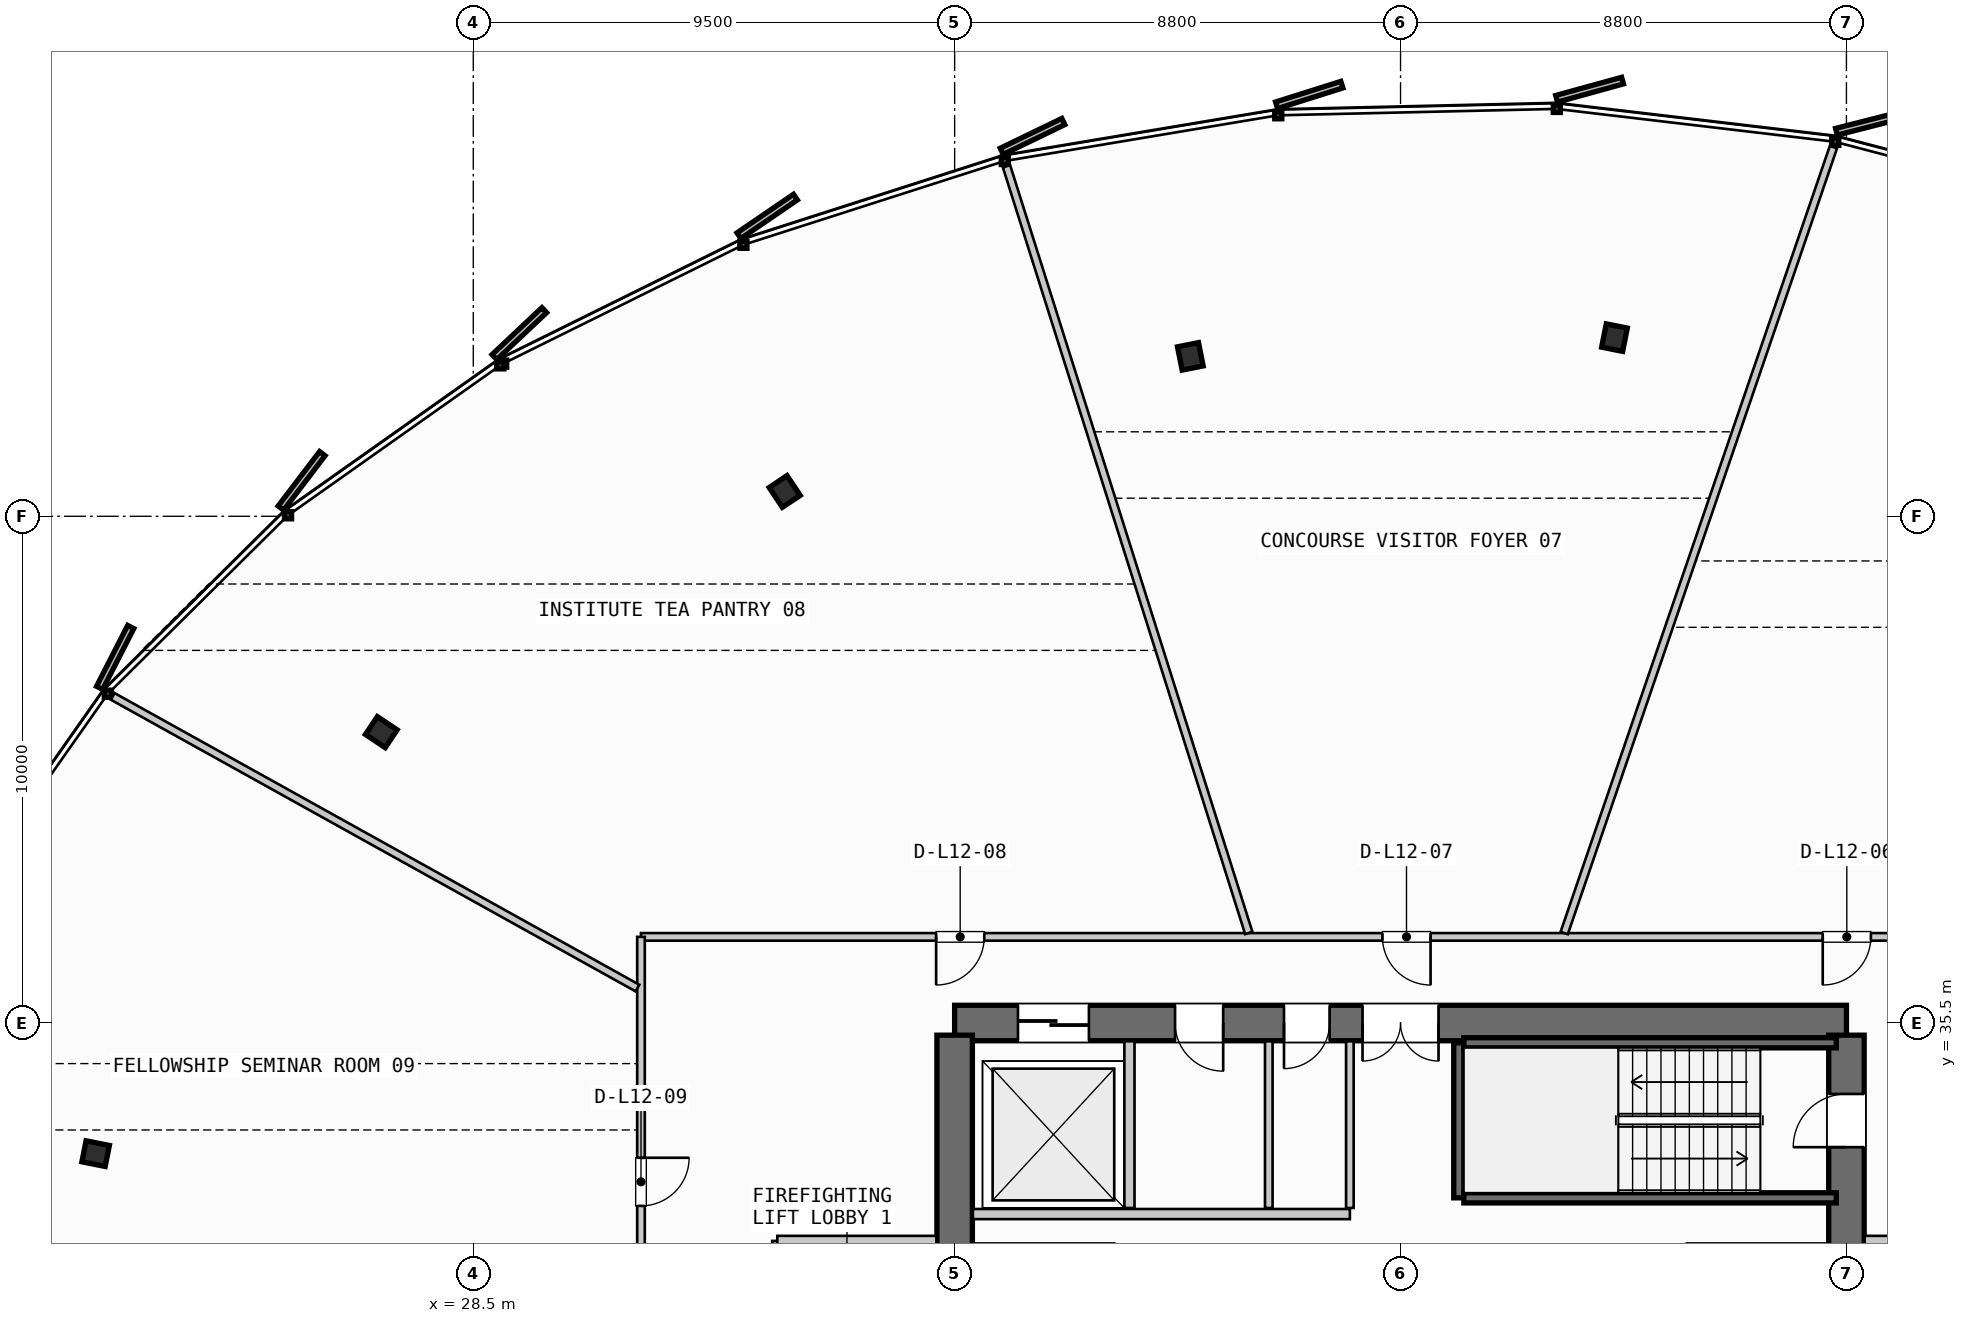
"""IFC4 building model, lengths in metres.
Left out: names, types, materials, properties, quantities, classifications, styles, units other than length and angle.
Written with IfcOpenShell. Run it as: python <this file> out.ifc"""

import sys

from ifc_helpers import new_model, si_unit, direction, frame, frame_2d, origin, origin_2d, place, context, subcontext, project, spatial, rectangle, i_section, extrude, source, transform, mapped, element, fill, save


model = new_model("IFC4")
c1 = context("Model", 3, precision=1e-05, world=origin(), true_north=direction((0.0, 1.0)))
c2 = subcontext(c1, "Body", "Model", "MODEL_VIEW")
j1 = project(units=[si_unit("LENGTHUNIT", "METRE"), si_unit("PLANEANGLEUNIT", "RADIAN")], contexts=[c1])
p1 = place(None, origin())
s1 = spatial("IfcSite", under=j1, at=p1, CompositionType="ELEMENT")
p2 = place(p1, origin())
s2 = spatial("IfcBuilding", under=s1, at=p2, CompositionType="ELEMENT")
p3 = place(p2, frame((0.0, 0.0, 52.4)))
s3 = spatial("IfcBuildingStorey", under=s2, at=p3, CompositionType="ELEMENT", Elevation=52.4)
p4 = place(p3, frame((55.6, 35.5, 0.0), z_axis=(0.0, 0.0, 1.0), x_axis=(-1.0, 0.0, 0.0)))
e1 = element("IfcWall", 1, at=p4, inside=s3, PredefinedType="SHEAR", context=c2, shape_type="SweptSolid", body=[
    extrude(rectangle(XDim=17.6, YDim=0.7, at=frame_2d((8.8, 0.0))), origin(), (0.0, 0.0, 1.0), 3.55),
])
p5 = place(p4, frame((8.05, 0.0, 0.0)))
e2 = element("IfcOpeningElement", 2, at=p5, cuts=e1, PredefinedType="OPENING", context=c2, shape_type="SweptSolid", body=[
    extrude(rectangle(XDim=1.5, YDim=2.2, at=frame_2d((0.75, 1.1))), frame((0.0, 0.36, 0.0), z_axis=(0.0, -1.0, 0.0), x_axis=(1.0, 0.0, 0.0)), (0.0, 0.0, 1.0), 0.72),
])
p6 = place(p4, frame((14.95, 0.0, 0.0)))
e3 = element("IfcOpeningElement", 3, at=p6, cuts=e1, PredefinedType="OPENING", context=c2, shape_type="SweptSolid", body=[
    extrude(rectangle(XDim=1.4, YDim=2.3, at=frame_2d((0.7, 1.15))), frame((0.0, 0.36, 0.0), z_axis=(0.0, -1.0, 0.0), x_axis=(1.0, 0.0, 0.0)), (0.0, 0.0, 1.0), 0.72),
])
p7 = place(p4, frame((12.3, 0.0, 0.0)))
e4 = element("IfcOpeningElement", 4, at=p7, cuts=e1, PredefinedType="OPENING", context=c2, shape_type="SweptSolid", body=[
    extrude(rectangle(XDim=0.95, YDim=2.15, at=frame_2d((0.475, 1.075))), frame((0.0, 0.36, 0.0), z_axis=(0.0, -1.0, 0.0), x_axis=(1.0, 0.0, 0.0)), (0.0, 0.0, 1.0), 0.72),
])
p8 = place(p4, frame((10.2, 0.0, 0.0)))
e5 = element("IfcOpeningElement", 5, at=p8, cuts=e1, PredefinedType="OPENING", context=c2, shape_type="SweptSolid", body=[
    extrude(rectangle(XDim=0.9, YDim=2.15, at=frame_2d((0.45, 1.075))), frame((0.0, 0.36, 0.0), z_axis=(0.0, -1.0, 0.0), x_axis=(1.0, 0.0, 0.0)), (0.0, 0.0, 1.0), 0.72),
])
p9 = place(p3, frame((38.0, 35.26, 0.0), z_axis=(0.0, 0.0, 1.0), x_axis=(0.0, -1.0, 0.0)))
e6 = element("IfcWall", 6, at=p9, inside=s3, PredefinedType="SHEAR", context=c2, shape_type="SweptSolid", body=[
    extrude(rectangle(XDim=14.92, YDim=0.7, at=frame_2d((7.46, 0.0))), origin(), (0.0, 0.0, 1.0), 3.55),
])
p10 = place(p9, frame((5.21, 0.0, 0.0)))
e7 = element("IfcOpeningElement", 7, at=p10, cuts=e6, PredefinedType="OPENING", context=c2, shape_type="SweptSolid", body=[
    extrude(rectangle(XDim=1.1, YDim=2.2, at=frame_2d((0.55, 1.1))), frame((0.0, 0.36, 0.0), z_axis=(0.0, -1.0, 0.0), x_axis=(1.0, 0.0, 0.0)), (0.0, 0.0, 1.0), 0.72),
])
p11 = place(p3, frame((55.6, 20.34, 0.0), z_axis=(0.0, 0.0, 1.0), x_axis=(0.0, 1.0, 0.0)))
e8 = element("IfcWall", 8, at=p11, inside=s3, PredefinedType="SHEAR", context=c2, shape_type="SweptSolid", body=[
    extrude(rectangle(XDim=14.92, YDim=0.7, at=frame_2d((7.46, 0.0))), origin(), (0.0, 0.0, 1.0), 3.55),
])
p12 = place(p11, frame((12.71, 0.0, 0.0)))
e9 = element("IfcOpeningElement", 9, at=p12, cuts=e8, PredefinedType="OPENING", context=c2, shape_type="SweptSolid", body=[
    extrude(rectangle(XDim=1.05, YDim=2.15, at=frame_2d((0.525, 1.075))), frame((0.0, 0.36, 0.0), z_axis=(0.0, -1.0, 0.0), x_axis=(1.0, 0.0, 0.0)), (0.0, 0.0, 1.0), 0.72),
])
p13 = place(p11, frame((8.61, 0.0, 0.0)))
e10 = element("IfcOpeningElement", 10, at=p13, cuts=e8, PredefinedType="OPENING", context=c2, shape_type="SweptSolid", body=[
    extrude(rectangle(XDim=1.1, YDim=2.2, at=frame_2d((0.55, 1.1))), frame((0.0, 0.36, 0.0), z_axis=(0.0, -1.0, 0.0), x_axis=(1.0, 0.0, 0.0)), (0.0, 0.0, 1.0), 0.72),
])
m1 = source(origin(), c2, "Body", "SweptSolid", [
    extrude(i_section(OverallWidth=0.423, OverallDepth=0.469, WebThickness=0.051, FlangeThickness=0.081, FilletRadius=0.015, at=origin_2d()), origin(), (0.0, 0.0, 1.0), 3.55),
])
for number, where, z_axis, x_axis in (
    (11, (51.022, 49.026, 0.0), (0.0, 0.0, 1.0), (0.195, 0.981, 0.0)),
    (12, (42.652, 48.656, 0.0), (0.0, 0.0, 1.0), (-0.195, 0.981, 0.0)),
    (13, (34.646, 45.99, 0.0), (0.0, 0.0, 1.0), (-0.556, 0.831, 0.0)),
    (14, (26.685, 41.241, 0.0), (0.0, 0.0, 1.0), (-0.831, 0.556, 0.0)),
    (15, (21.047, 32.923, 0.0), (0.0, 0.0, 1.0), (-0.981, 0.195, 0.0)),
):
    element("IfcColumn", number, at=place(p3, frame(where, z_axis=z_axis, x_axis=x_axis)), inside=s3, PredefinedType="COLUMN", context=c2, shape_type="MappedRepresentation", body=[
        mapped(m1, transform((0.0, 0.0, 0.0), scale=1.0)),
    ])
p14 = place(p3, frame((47.95, 32.05, 0.0), z_axis=(0.0, 0.0, 1.0), x_axis=(0.0, 1.0, 0.0)))
e16 = element("IfcWall", 16, at=p14, inside=s3, PredefinedType="SHEAR", context=c2, shape_type="SweptSolid", body=[
    extrude(rectangle(XDim=3.06, YDim=0.2, at=frame_2d((1.53, 0.0))), origin(), (0.0, 0.0, 1.0), 3.55),
])
for number, where, z_axis, x_axis in (
    (17, (48.05, 35.11, 0.0), (0.0, 0.0, 1.0), (1.0, 0.0, 0.0)),
    (18, (55.4, 32.05, 0.0), (0.0, 0.0, 1.0), (-1.0, 0.0, 0.0)),
):
    element("IfcWall", number, at=place(p3, frame(where, z_axis=z_axis, x_axis=x_axis)), inside=s3, PredefinedType="SHEAR", context=c2, shape_type="SweptSolid", body=[
        extrude(rectangle(XDim=7.35, YDim=0.2, at=frame_2d((3.675, 0.0))), origin(), (0.0, 0.0, 1.0), 3.55),
    ])
p15 = place(p3, frame((38.36, 31.05, 0.0), z_axis=(0.0, 0.0, 1.0), x_axis=(1.0, 0.0, 0.0)))
e19 = element("IfcWall", 19, at=p15, inside=s3, PredefinedType="PARTITIONING", context=c2, shape_type="SweptSolid", body=[
    extrude(rectangle(XDim=2.79, YDim=0.2, at=frame_2d((1.395, 0.0))), origin(), (0.0, 0.0, 1.0), 2.645),
])
p16 = place(p3, frame((34.5, 31.2, 0.0), z_axis=(0.0, 0.0, 1.0), x_axis=(0.0, -1.0, 0.0)))
e20 = element("IfcWall", 20, at=p16, inside=s3, PredefinedType="PARTITIONING", context=c2, shape_type="SweptSolid", body=[
    extrude(rectangle(XDim=4.4, YDim=0.2, at=frame_2d((2.2, 0.0))), origin(), (0.0, 0.0, 1.0), 2.645),
])
p17 = place(p16, frame((1.65, 0.0, 0.0)))
e21 = element("IfcOpeningElement", 21, at=p17, cuts=e20, PredefinedType="OPENING", context=c2, shape_type="SweptSolid", body=[
    extrude(rectangle(XDim=1.05, YDim=2.15, at=frame_2d((0.525, 1.075))), frame((0.0, 0.11, 0.0), z_axis=(0.0, -1.0, 0.0), x_axis=(1.0, 0.0, 0.0)), (0.0, 0.0, 1.0), 0.22),
])
p18 = place(p3, frame((34.5, 31.2, 0.0), z_axis=(0.0, 0.0, 1.0), x_axis=(1.0, 0.0, 0.0)))
e22 = element("IfcWall", 22, at=p18, inside=s3, PredefinedType="PARTITIONING", context=c2, shape_type="SweptSolid", body=[
    extrude(rectangle(XDim=3.14, YDim=0.2, at=frame_2d((1.57, 0.0))), origin(), (0.0, 0.0, 1.0), 2.645),
])
p19 = place(p3, frame((52.45, 31.05, 0.0), z_axis=(0.0, 0.0, 1.0), x_axis=(1.0, 0.0, 0.0)))
e23 = element("IfcWall", 23, at=p19, inside=s3, PredefinedType="PARTITIONING", context=c2, shape_type="SweptSolid", body=[
    extrude(rectangle(XDim=2.79, YDim=0.2, at=frame_2d((1.395, 0.0))), origin(), (0.0, 0.0, 1.0), 2.645),
])
p20 = place(p3, frame((55.96, 31.2, 0.0), z_axis=(0.0, 0.0, 1.0), x_axis=(1.0, 0.0, 0.0)))
e24 = element("IfcWall", 24, at=p20, inside=s3, PredefinedType="PARTITIONING", context=c2, shape_type="SweptSolid", body=[
    extrude(rectangle(XDim=3.14, YDim=0.2, at=frame_2d((1.57, 0.0))), origin(), (0.0, 0.0, 1.0), 2.645),
])
p21 = place(p3, frame((41.45, 31.85, 0.0), z_axis=(0.0, 0.0, 1.0), x_axis=(0.0, 1.0, 0.0)))
e25 = element("IfcWall", 25, at=p21, inside=s3, PredefinedType="PARTITIONING", context=c2, shape_type="SweptSolid", body=[
    extrude(rectangle(XDim=3.29, YDim=0.2, at=frame_2d((1.645, 0.0))), origin(), (0.0, 0.0, 1.0), 2.645),
])
p22 = place(p3, frame((38.36, 31.73, 0.0), z_axis=(0.0, 0.0, 1.0), x_axis=(1.0, 0.0, 0.0)))
e26 = element("IfcWall", 26, at=p22, inside=s3, PredefinedType="PARTITIONING", context=c2, shape_type="SweptSolid", body=[
    extrude(rectangle(XDim=7.44, YDim=0.2, at=frame_2d((3.72, 0.0))), origin(), (0.0, 0.0, 1.0), 2.645),
])
p23 = place(p3, frame((45.8, 31.85, 0.0), z_axis=(0.0, 0.0, 1.0), x_axis=(0.0, 1.0, 0.0)))
e27 = element("IfcWall", 27, at=p23, inside=s3, PredefinedType="PARTITIONING", context=c2, shape_type="SweptSolid", body=[
    extrude(rectangle(XDim=3.29, YDim=0.15, at=frame_2d((1.645, 0.0))), origin(), (0.0, 0.0, 1.0), 2.645),
])
p24 = place(p3, frame((44.2, 31.85, 0.0), z_axis=(0.0, 0.0, 1.0), x_axis=(0.0, 1.0, 0.0)))
e28 = element("IfcWall", 28, at=p24, inside=s3, PredefinedType="PLUMBINGWALL", context=c2, shape_type="SweptSolid", body=[
    extrude(rectangle(XDim=3.29, YDim=0.15, at=frame_2d((1.645, 0.0))), origin(), (0.0, 0.0, 1.0), 2.645),
])
p25 = place(p3, frame((61.79, 37.2, 0.0), z_axis=(0.0, 0.0, 1.0), x_axis=(-1.0, 0.0, 0.0)))
e29 = element("IfcWall", 29, at=p25, inside=s3, PredefinedType="PARTITIONING", context=c2, shape_type="SweptSolid", body=[
    extrude(rectangle(XDim=29.98, YDim=0.15, at=frame_2d((14.99, 0.0))), origin(), (0.0, 0.0, 1.0), 2.645),
])
p26 = place(p25, frame((5.708, 0.0, 0.0)))
e30 = element("IfcOpeningElement", 30, at=p26, cuts=e29, PredefinedType="OPENING", context=c2, shape_type="SweptSolid", body=[
    extrude(rectangle(XDim=0.95, YDim=2.15, at=frame_2d((0.475, 1.075))), frame((0.0, 0.085, 0.0), z_axis=(0.0, -1.0, 0.0), x_axis=(1.0, 0.0, 0.0)), (0.0, 0.0, 1.0), 0.17),
])
p27 = place(p25, frame((14.397, 0.0, 0.0)))
e31 = element("IfcOpeningElement", 31, at=p27, cuts=e29, PredefinedType="OPENING", context=c2, shape_type="SweptSolid", body=[
    extrude(rectangle(XDim=0.95, YDim=2.15, at=frame_2d((0.475, 1.075))), frame((0.0, 0.085, 0.0), z_axis=(0.0, -1.0, 0.0), x_axis=(1.0, 0.0, 0.0)), (0.0, 0.0, 1.0), 0.17),
])
p28 = place(p25, frame((23.206, 0.0, 0.0)))
e32 = element("IfcOpeningElement", 32, at=p28, cuts=e29, PredefinedType="OPENING", context=c2, shape_type="SweptSolid", body=[
    extrude(rectangle(XDim=0.95, YDim=2.15, at=frame_2d((0.475, 1.075))), frame((0.0, 0.085, 0.0), z_axis=(0.0, -1.0, 0.0), x_axis=(1.0, 0.0, 0.0)), (0.0, 0.0, 1.0), 0.17),
])
p29 = place(p3, frame((31.81, 37.2, 0.0), z_axis=(0.0, 0.0, 1.0), x_axis=(0.0, -1.0, 0.0)))
e33 = element("IfcWall", 33, at=p29, inside=s3, PredefinedType="PARTITIONING", context=c2, shape_type="SweptSolid", body=[
    extrude(rectangle(XDim=19.22, YDim=0.15, at=frame_2d((9.61, 0.0))), origin(), (0.0, 0.0, 1.0), 2.645),
])
p30 = place(p29, frame((4.359, 0.0, 0.0)))
e34 = element("IfcOpeningElement", 34, at=p30, cuts=e33, PredefinedType="OPENING", context=c2, shape_type="SweptSolid", body=[
    extrude(rectangle(XDim=0.95, YDim=2.15, at=frame_2d((0.475, 1.075))), frame((0.0, 0.085, 0.0), z_axis=(0.0, -1.0, 0.0), x_axis=(1.0, 0.0, 0.0)), (0.0, 0.0, 1.0), 0.17),
])
p31 = place(p29, frame((13.033, 0.0, 0.0)))
e35 = element("IfcOpeningElement", 35, at=p31, cuts=e33, PredefinedType="OPENING", context=c2, shape_type="SweptSolid", body=[
    extrude(rectangle(XDim=0.95, YDim=2.15, at=frame_2d((0.475, 1.075))), frame((0.0, 0.085, 0.0), z_axis=(0.0, -1.0, 0.0), x_axis=(1.0, 0.0, 0.0)), (0.0, 0.0, 1.0), 0.17),
])
p32 = place(p3, frame((50.03, 37.276, 0.0), z_axis=(0.0, 0.0, 1.0), x_axis=(0.324074949721, 0.946031409079, 0.0)))
e36 = element("IfcWall", 36, at=p32, inside=s3, PredefinedType="PARTITIONING", context=c2, shape_type="SweptSolid", body=[
    extrude(rectangle(XDim=16.395, YDim=0.15, at=frame_2d((8.198, 0.0))), origin(), (0.0, 0.0, 1.0), 2.645),
])
p33 = place(p3, frame((43.805, 37.276, 0.0), z_axis=(0.0, 0.0, 1.0), x_axis=(-0.301331638251, 0.953519398748, 0.0)))
e37 = element("IfcWall", 37, at=p33, inside=s3, PredefinedType="PARTITIONING", context=c2, shape_type="SweptSolid", body=[
    extrude(rectangle(XDim=15.869, YDim=0.15, at=frame_2d((7.934, 0.0))), origin(), (0.0, 0.0, 1.0), 2.645),
])
p34 = place(p3, frame((31.74, 36.19, 0.0), z_axis=(0.0, 0.0, 1.0), x_axis=(-0.87407755514, 0.48578640121, 0.0)))
e38 = element("IfcWall", 38, at=p34, inside=s3, PredefinedType="PARTITIONING", context=c2, shape_type="SweptSolid", body=[
    extrude(rectangle(XDim=11.847, YDim=0.15, at=frame_2d((5.923, 0.0))), origin(), (0.0, 0.0, 1.0), 2.645),
])
m2 = source(origin(), c2, "Body", "SweptSolid", [
    extrude(rectangle(XDim=1.05, YDim=2.15, at=frame_2d((0.525, 1.075))), frame((0.0, 0.025, 0.0), z_axis=(0.0, -1.0, 0.0), x_axis=(1.0, 0.0, 0.0)), (0.0, 0.0, 1.0), 0.05),
])
p35 = place(p12, origin())
e39 = element("IfcDoor", 39, at=p35, inside=s3, OperationType="SINGLE_SWING_LEFT", PredefinedType="DOOR", context=c2, shape_type="MappedRepresentation", body=[
    mapped(m2, transform((0.0, 0.0, 0.0), scale=1.0)),
])
fill(e9, e39)
m3 = source(origin(), c2, "Body", "SweptSolid", [
    extrude(rectangle(XDim=1.5, YDim=2.2, at=frame_2d((0.75, 1.1))), frame((0.0, 0.025, 0.0), z_axis=(0.0, -1.0, 0.0), x_axis=(1.0, 0.0, 0.0)), (0.0, 0.0, 1.0), 0.05),
])
p36 = place(p5, origin())
e40 = element("IfcDoor", 40, at=p36, inside=s3, OperationType="DOUBLE_DOOR_SINGLE_SWING", PredefinedType="DOOR", context=c2, shape_type="MappedRepresentation", body=[
    mapped(m3, transform((0.0, 0.0, 0.0), scale=1.0)),
])
fill(e2, e40)
m4 = source(origin(), c2, "Body", "SweptSolid", [
    extrude(rectangle(XDim=1.4, YDim=2.3, at=frame_2d((0.7, 1.15))), frame((0.0, 0.025, 0.0), z_axis=(0.0, -1.0, 0.0), x_axis=(1.0, 0.0, 0.0)), (0.0, 0.0, 1.0), 0.05),
])
p37 = place(p6, origin())
e41 = element("IfcDoor", 41, at=p37, inside=s3, OperationType="SLIDING_TO_RIGHT", PredefinedType="DOOR", context=c2, shape_type="MappedRepresentation", body=[
    mapped(m4, transform((0.0, 0.0, 0.0), scale=1.0)),
])
fill(e3, e41)
m5 = source(origin(), c2, "Body", "SweptSolid", [
    extrude(rectangle(XDim=0.95, YDim=2.15, at=frame_2d((0.475, 1.075))), frame((0.0, 0.025, 0.0), z_axis=(0.0, -1.0, 0.0), x_axis=(1.0, 0.0, 0.0)), (0.0, 0.0, 1.0), 0.05),
])
p38 = place(p7, origin())
e42 = element("IfcDoor", 42, at=p38, inside=s3, OperationType="SINGLE_SWING_LEFT", PredefinedType="DOOR", context=c2, shape_type="MappedRepresentation", body=[
    mapped(m5, transform((0.0, 0.0, 0.0), scale=1.0)),
])
fill(e4, e42)
m6 = source(origin(), c2, "Body", "SweptSolid", [
    extrude(rectangle(XDim=0.9, YDim=2.15, at=frame_2d((0.45, 1.075))), frame((0.0, 0.025, 0.0), z_axis=(0.0, -1.0, 0.0), x_axis=(1.0, 0.0, 0.0)), (0.0, 0.0, 1.0), 0.05),
])
p39 = place(p8, origin())
e43 = element("IfcDoor", 43, at=p39, inside=s3, OperationType="SINGLE_SWING_RIGHT", PredefinedType="DOOR", context=c2, shape_type="MappedRepresentation", body=[
    mapped(m6, transform((0.0, 0.0, 0.0), scale=1.0)),
])
fill(e5, e43)
p40 = place(p26, origin())
e44 = element("IfcDoor", 44, at=p40, inside=s3, OperationType="SINGLE_SWING_RIGHT", PredefinedType="DOOR", context=c2, shape_type="MappedRepresentation", body=[
    mapped(m5, transform((0.0, 0.0, 0.0), scale=1.0)),
])
fill(e30, e44)
p41 = place(p27, origin())
e45 = element("IfcDoor", 45, at=p41, inside=s3, OperationType="SINGLE_SWING_LEFT", PredefinedType="DOOR", context=c2, shape_type="MappedRepresentation", body=[
    mapped(m5, transform((0.0, 0.0, 0.0), scale=1.0)),
])
fill(e31, e45)
p42 = place(p28, origin())
e46 = element("IfcDoor", 46, at=p42, inside=s3, OperationType="SINGLE_SWING_RIGHT", PredefinedType="DOOR", context=c2, shape_type="MappedRepresentation", body=[
    mapped(m5, transform((0.0, 0.0, 0.0), scale=1.0)),
])
fill(e32, e46)
p43 = place(p30, origin())
e47 = element("IfcDoor", 47, at=p43, inside=s3, OperationType="SINGLE_SWING_LEFT", PredefinedType="DOOR", context=c2, shape_type="MappedRepresentation", body=[
    mapped(m5, transform((0.0, 0.0, 0.0), scale=1.0)),
])
fill(e34, e47)
save(model, sys.argv[1])
